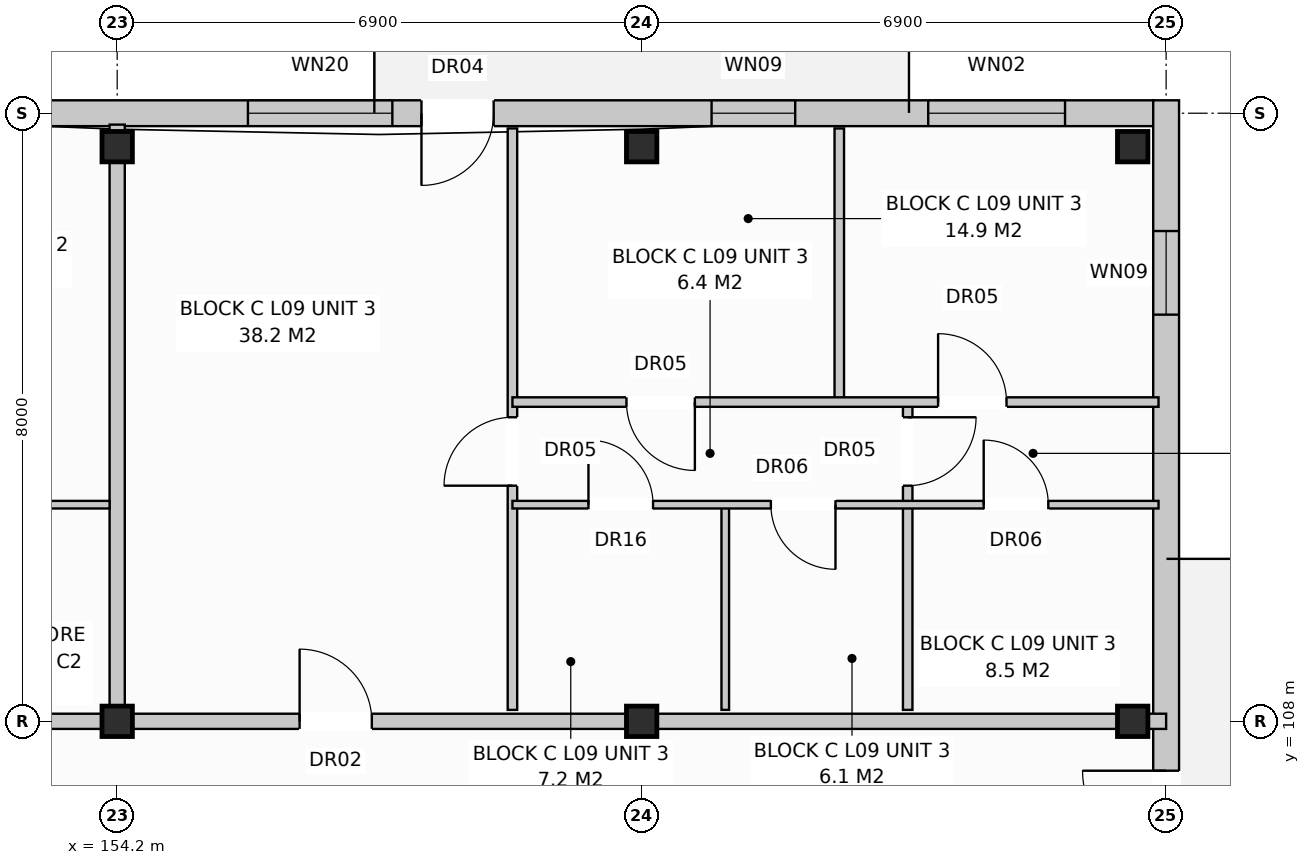
"""IFC4 building model, lengths in metres.
Left out: names, types, materials, properties, quantities, classifications, styles, units other than length and angle.
Written with IfcOpenShell. Run it as: python <this file> out.ifc"""

import sys

from ifc_helpers import new_model, si_unit, direction, frame, frame_2d, origin, origin_with_axes, origin_2d, place, context, subcontext, project, spatial, rectangle, extrude, element, fill, save


model = new_model("IFC4")
c1 = context("Model", 3, precision=1e-05, world=origin(), true_north=direction((0.0, 1.0)))
c2 = subcontext(c1, "Body", "Model", "MODEL_VIEW")
j1 = project(units=[si_unit("LENGTHUNIT", "METRE"), si_unit("PLANEANGLEUNIT", "RADIAN")], contexts=[c1])
p1 = place(None, origin())
s1 = spatial("IfcSite", under=j1, at=p1, CompositionType="ELEMENT")
p2 = place(p1, origin())
s2 = spatial("IfcBuilding", under=s1, at=p2, CompositionType="ELEMENT")
p3 = place(p2, frame((0.0, 0.0, 30.4)))
s3 = spatial("IfcBuildingStorey", under=s2, at=p3, CompositionType="ELEMENT", Elevation=30.4)
for number, where, z_axis, x_axis in (
    (1, (154.2, 108.0, 0.0), (0.0, 0.0, 1.0), (1.0, 0.0, 0.0)),
    (2, (154.2, 115.56, 0.0), (0.0, 0.0, 1.0), (1.0, 0.0, 0.0)),
    (3, (161.1, 108.0, 0.0), (0.0, 0.0, 1.0), (1.0, 0.0, 0.0)),
    (4, (161.1, 115.56, 0.0), (0.0, 0.0, 1.0), (1.0, 0.0, 0.0)),
    (5, (167.56, 108.0, 0.0), (0.0, 0.0, 1.0), (1.0, 0.0, 0.0)),
    (6, (167.56, 115.56, 0.0), (0.0, 0.0, 1.0), (1.0, 0.0, 0.0)),
):
    element("IfcColumn", number, at=place(p3, frame(where, z_axis=z_axis, x_axis=x_axis)), inside=s3, PredefinedType="COLUMN", context=c2, shape_type="SweptSolid", body=[
        extrude(rectangle(XDim=0.4, YDim=0.4, at=origin_2d()), origin(), (0.0, 0.0, 1.0), 3.2),
    ])
p4 = place(p3, frame((126.76, 116.0, 0.0), z_axis=(0.0, 0.0, 1.0), x_axis=(1.0, 0.0, 0.0)))
e7 = element("IfcWall", 7, at=p4, inside=s3, PredefinedType="STANDARD", context=c2, shape_type="SweptSolid", body=[
    extrude(rectangle(XDim=41.08, YDim=0.34, at=frame_2d((20.54, 0.0))), origin(), (0.0, 0.0, 1.0), 2.96),
])
p5 = place(p4, frame((5.11, 0.0, 0.0)))
e8 = element("IfcOpeningElement", 8, at=p5, cuts=e7, PredefinedType="OPENING", context=c2, shape_type="SweptSolid", body=[
    extrude(rectangle(XDim=0.95, YDim=2.1, at=frame_2d((0.475, 1.05))), frame((0.0, 0.182, 0.0), z_axis=(0.0, -1.0, 0.0), x_axis=(1.0, 0.0, 0.0)), (0.0, 0.0, 1.0), 0.364),
])
p6 = place(p4, frame((18.91, 0.0, 0.0)))
e9 = element("IfcOpeningElement", 9, at=p6, cuts=e7, PredefinedType="OPENING", context=c2, shape_type="SweptSolid", body=[
    extrude(rectangle(XDim=0.95, YDim=2.1, at=frame_2d((0.475, 1.05))), frame((0.0, 0.182, 0.0), z_axis=(0.0, -1.0, 0.0), x_axis=(1.0, 0.0, 0.0)), (0.0, 0.0, 1.0), 0.364),
])
p7 = place(p4, frame((31.443, 0.0, 0.0)))
e10 = element("IfcOpeningElement", 10, at=p7, cuts=e7, PredefinedType="OPENING", context=c2, shape_type="SweptSolid", body=[
    extrude(rectangle(XDim=0.95, YDim=2.1, at=frame_2d((0.475, 1.05))), frame((0.0, 0.182, 0.0), z_axis=(0.0, -1.0, 0.0), x_axis=(1.0, 0.0, 0.0)), (0.0, 0.0, 1.0), 0.364),
])
p8 = place(p4, frame((1.035, 0.0, 0.8)))
e11 = element("IfcOpeningElement", 11, at=p8, cuts=e7, PredefinedType="OPENING", context=c2, shape_type="SweptSolid", body=[
    extrude(rectangle(XDim=1.95, YDim=1.65, at=frame_2d((0.975, 0.825))), frame((0.0, 0.182, 0.0), z_axis=(0.0, -1.0, 0.0), x_axis=(1.0, 0.0, 0.0)), (0.0, 0.0, 1.0), 0.364),
])
p9 = place(p4, frame((9.36, 0.0, 0.72)))
e12 = element("IfcOpeningElement", 12, at=p9, cuts=e7, PredefinedType="OPENING", context=c2, shape_type="SweptSolid", body=[
    extrude(rectangle(XDim=1.1, YDim=1.5, at=frame_2d((0.55, 0.75))), frame((0.0, 0.182, 0.0), z_axis=(0.0, -1.0, 0.0), x_axis=(1.0, 0.0, 0.0)), (0.0, 0.0, 1.0), 0.364),
])
p10 = place(p4, frame((14.66, 0.0, 0.8)))
e13 = element("IfcOpeningElement", 13, at=p10, cuts=e7, PredefinedType="OPENING", context=c2, shape_type="SweptSolid", body=[
    extrude(rectangle(XDim=1.9, YDim=1.85, at=frame_2d((0.95, 0.925))), frame((0.0, 0.182, 0.0), z_axis=(0.0, -1.0, 0.0), x_axis=(1.0, 0.0, 0.0)), (0.0, 0.0, 1.0), 0.364),
])
p11 = place(p4, frame((21.46, 0.0, 0.72)))
e14 = element("IfcOpeningElement", 14, at=p11, cuts=e7, PredefinedType="OPENING", context=c2, shape_type="SweptSolid", body=[
    extrude(rectangle(XDim=1.1, YDim=1.5, at=frame_2d((0.55, 0.75))), frame((0.0, 0.182, 0.0), z_axis=(0.0, -1.0, 0.0), x_axis=(1.0, 0.0, 0.0)), (0.0, 0.0, 1.0), 0.364),
])
p12 = place(p4, frame((24.51, 0.0, 0.8)))
e15 = element("IfcOpeningElement", 15, at=p12, cuts=e7, PredefinedType="OPENING", context=c2, shape_type="SweptSolid", body=[
    extrude(rectangle(XDim=1.8, YDim=1.7, at=frame_2d((0.9, 0.85))), frame((0.0, 0.182, 0.0), z_axis=(0.0, -1.0, 0.0), x_axis=(1.0, 0.0, 0.0)), (0.0, 0.0, 1.0), 0.364),
])
p13 = place(p4, frame((29.16, 0.0, 0.8)))
e16 = element("IfcOpeningElement", 16, at=p13, cuts=e7, PredefinedType="OPENING", context=c2, shape_type="SweptSolid", body=[
    extrude(rectangle(XDim=1.9, YDim=1.85, at=frame_2d((0.95, 0.925))), frame((0.0, 0.182, 0.0), z_axis=(0.0, -1.0, 0.0), x_axis=(1.0, 0.0, 0.0)), (0.0, 0.0, 1.0), 0.364),
])
p14 = place(p4, frame((35.26, 0.0, 0.72)))
e17 = element("IfcOpeningElement", 17, at=p14, cuts=e7, PredefinedType="OPENING", context=c2, shape_type="SweptSolid", body=[
    extrude(rectangle(XDim=1.1, YDim=1.5, at=frame_2d((0.55, 0.75))), frame((0.0, 0.182, 0.0), z_axis=(0.0, -1.0, 0.0), x_axis=(1.0, 0.0, 0.0)), (0.0, 0.0, 1.0), 0.364),
])
p15 = place(p4, frame((38.11, 0.0, 0.8)))
e18 = element("IfcOpeningElement", 18, at=p15, cuts=e7, PredefinedType="OPENING", context=c2, shape_type="SweptSolid", body=[
    extrude(rectangle(XDim=1.8, YDim=1.7, at=frame_2d((0.9, 0.85))), frame((0.0, 0.182, 0.0), z_axis=(0.0, -1.0, 0.0), x_axis=(1.0, 0.0, 0.0)), (0.0, 0.0, 1.0), 0.364),
])
p16 = place(p3, frame((168.0, 97.43, 0.0), z_axis=(0.0, 0.0, 1.0), x_axis=(0.0, 1.0, 0.0)))
e19 = element("IfcWall", 19, at=p16, inside=s3, PredefinedType="STANDARD", context=c2, shape_type="SweptSolid", body=[
    extrude(rectangle(XDim=18.74, YDim=0.34, at=frame_2d((9.37, 0.0))), origin(), (0.0, 0.0, 1.0), 2.96),
])
p17 = place(p16, frame((8.82, 0.0, 0.0)))
e20 = element("IfcOpeningElement", 20, at=p17, cuts=e19, PredefinedType="OPENING", context=c2, shape_type="SweptSolid", body=[
    extrude(rectangle(XDim=1.1, YDim=2.1, at=frame_2d((0.55, 1.05))), frame((0.0, 0.182, 0.0), z_axis=(0.0, -1.0, 0.0), x_axis=(1.0, 0.0, 0.0)), (0.0, 0.0, 1.0), 0.364),
])
p18 = place(p16, frame((1.72, 0.0, 0.72)))
e21 = element("IfcOpeningElement", 21, at=p18, cuts=e19, PredefinedType="OPENING", context=c2, shape_type="SweptSolid", body=[
    extrude(rectangle(XDim=1.1, YDim=1.5, at=frame_2d((0.55, 0.75))), frame((0.0, 0.182, 0.0), z_axis=(0.0, -1.0, 0.0), x_axis=(1.0, 0.0, 0.0)), (0.0, 0.0, 1.0), 0.364),
])
p19 = place(p16, frame((15.92, 0.0, 0.72)))
e22 = element("IfcOpeningElement", 22, at=p19, cuts=e19, PredefinedType="OPENING", context=c2, shape_type="SweptSolid", body=[
    extrude(rectangle(XDim=1.1, YDim=1.5, at=frame_2d((0.55, 0.75))), frame((0.0, 0.182, 0.0), z_axis=(0.0, -1.0, 0.0), x_axis=(1.0, 0.0, 0.0)), (0.0, 0.0, 1.0), 0.364),
])
p20 = place(p3, frame((154.2, 108.15, 0.0), z_axis=(0.0, 0.0, 1.0), x_axis=(0.0, 1.0, 0.0)))
e23 = element("IfcWall", 23, at=p20, inside=s3, PredefinedType="PARTITIONING", context=c2, shape_type="SweptSolid", body=[
    extrude(rectangle(XDim=7.7, YDim=0.2, at=frame_2d((3.85, 0.0))), origin(), (0.0, 0.0, 1.0), 2.96),
])
p21 = place(p3, frame((133.5, 108.0, 0.0), z_axis=(0.0, 0.0, 1.0), x_axis=(1.0, 0.0, 0.0)))
e24 = element("IfcWall", 24, at=p21, inside=s3, PredefinedType="PARTITIONING", context=c2, shape_type="SweptSolid", body=[
    extrude(rectangle(XDim=20.7, YDim=0.2, at=frame_2d((10.35, 0.0))), origin(), (0.0, 0.0, 1.0), 2.4),
])
p22 = place(p21, frame((2.4, 0.0, 0.0)))
e25 = element("IfcOpeningElement", 25, at=p22, cuts=e24, PredefinedType="OPENING", context=c2, shape_type="SweptSolid", body=[
    extrude(rectangle(XDim=0.95, YDim=2.15, at=frame_2d((0.475, 1.075))), frame((0.0, 0.112, 0.0), z_axis=(0.0, -1.0, 0.0), x_axis=(1.0, 0.0, 0.0)), (0.0, 0.0, 1.0), 0.224),
])
p23 = place(p3, frame((139.8, 110.85, 0.0), z_axis=(0.0, 0.0, 1.0), x_axis=(1.0, 0.0, 0.0)))
e26 = element("IfcWall", 26, at=p23, inside=s3, PredefinedType="PARTITIONING", context=c2, shape_type="SweptSolid", body=[
    extrude(rectangle(XDim=14.3, YDim=0.1, at=frame_2d((7.15, 0.0))), origin(), (0.0, 0.0, 1.0), 2.96),
])
p24 = place(p23, frame((1.6, 0.0, 0.0)))
e27 = element("IfcOpeningElement", 27, at=p24, cuts=e26, PredefinedType="OPENING", context=c2, shape_type="SweptSolid", body=[
    extrude(rectangle(XDim=0.9, YDim=2.1, at=frame_2d((0.45, 1.05))), frame((0.0, 0.062, 0.0), z_axis=(0.0, -1.0, 0.0), x_axis=(1.0, 0.0, 0.0)), (0.0, 0.0, 1.0), 0.124),
])
p25 = place(p23, frame((5.1, 0.0, 0.0)))
e28 = element("IfcOpeningElement", 28, at=p25, cuts=e26, PredefinedType="OPENING", context=c2, shape_type="SweptSolid", body=[
    extrude(rectangle(XDim=0.85, YDim=2.05, at=frame_2d((0.425, 1.025))), frame((0.0, 0.062, 0.0), z_axis=(0.0, -1.0, 0.0), x_axis=(1.0, 0.0, 0.0)), (0.0, 0.0, 1.0), 0.124),
])
p26 = place(p23, frame((8.2, 0.0, 0.0)))
e29 = element("IfcOpeningElement", 29, at=p26, cuts=e26, PredefinedType="OPENING", context=c2, shape_type="SweptSolid", body=[
    extrude(rectangle(XDim=0.85, YDim=2.05, at=frame_2d((0.425, 1.025))), frame((0.0, 0.062, 0.0), z_axis=(0.0, -1.0, 0.0), x_axis=(1.0, 0.0, 0.0)), (0.0, 0.0, 1.0), 0.124),
])
p27 = place(p23, frame((11.6, 0.0, 0.0)))
e30 = element("IfcOpeningElement", 30, at=p27, cuts=e26, PredefinedType="OPENING", context=c2, shape_type="SweptSolid", body=[
    extrude(rectangle(XDim=0.85, YDim=2.05, at=frame_2d((0.425, 1.025))), frame((0.0, 0.062, 0.0), z_axis=(0.0, -1.0, 0.0), x_axis=(1.0, 0.0, 0.0)), (0.0, 0.0, 1.0), 0.124),
])
p28 = place(p3, frame((154.2, 108.0, 0.0), z_axis=(0.0, 0.0, 1.0), x_axis=(1.0, 0.0, 0.0)))
e31 = element("IfcWall", 31, at=p28, inside=s3, PredefinedType="PARTITIONING", context=c2, shape_type="SweptSolid", body=[
    extrude(rectangle(XDim=13.8, YDim=0.2, at=frame_2d((6.9, 0.0))), origin(), (0.0, 0.0, 1.0), 2.4),
])
p29 = place(p28, frame((2.4, 0.0, 0.0)))
e32 = element("IfcOpeningElement", 32, at=p29, cuts=e31, PredefinedType="OPENING", context=c2, shape_type="SweptSolid", body=[
    extrude(rectangle(XDim=0.95, YDim=2.15, at=frame_2d((0.475, 1.075))), frame((0.0, 0.112, 0.0), z_axis=(0.0, -1.0, 0.0), x_axis=(1.0, 0.0, 0.0)), (0.0, 0.0, 1.0), 0.224),
])
p30 = place(p3, frame((159.4, 108.15, 0.0), z_axis=(0.0, 0.0, 1.0), x_axis=(0.0, 1.0, 0.0)))
e33 = element("IfcWall", 33, at=p30, inside=s3, PredefinedType="PARTITIONING", context=c2, shape_type="SweptSolid", body=[
    extrude(rectangle(XDim=7.65, YDim=0.125, at=frame_2d((3.825, 0.0))), origin(), (0.0, 0.0, 1.0), 2.96),
])
p31 = place(p30, frame((2.95, 0.0, 0.0)))
e34 = element("IfcOpeningElement", 34, at=p31, cuts=e33, PredefinedType="OPENING", context=c2, shape_type="SweptSolid", body=[
    extrude(rectangle(XDim=0.9, YDim=2.1, at=frame_2d((0.45, 1.05))), frame((0.0, 0.074, 0.0), z_axis=(0.0, -1.0, 0.0), x_axis=(1.0, 0.0, 0.0)), (0.0, 0.0, 1.0), 0.149),
])
p32 = place(p3, frame((162.2, 108.15, 0.0), z_axis=(0.0, 0.0, 1.0), x_axis=(0.0, 1.0, 0.0)))
e35 = element("IfcWall", 35, at=p32, inside=s3, PredefinedType="PARTITIONING", context=c2, shape_type="SweptSolid", body=[
    extrude(rectangle(XDim=2.7, YDim=0.1, at=frame_2d((1.35, 0.0))), origin(), (0.0, 0.0, 1.0), 2.96),
])
p33 = place(p3, frame((164.6, 108.15, 0.0), z_axis=(0.0, 0.0, 1.0), x_axis=(0.0, 1.0, 0.0)))
e36 = element("IfcWall", 36, at=p33, inside=s3, PredefinedType="PARTITIONING", context=c2, shape_type="SweptSolid", body=[
    extrude(rectangle(XDim=4.05, YDim=0.125, at=frame_2d((2.025, 0.0))), origin(), (0.0, 0.0, 1.0), 2.96),
])
p34 = place(p33, frame((2.95, 0.0, 0.0)))
e37 = element("IfcOpeningElement", 37, at=p34, cuts=e36, PredefinedType="OPENING", context=c2, shape_type="SweptSolid", body=[
    extrude(rectangle(XDim=0.9, YDim=2.1, at=frame_2d((0.45, 1.05))), frame((0.0, 0.074, 0.0), z_axis=(0.0, -1.0, 0.0), x_axis=(1.0, 0.0, 0.0)), (0.0, 0.0, 1.0), 0.149),
])
p35 = place(p3, frame((163.7, 112.2, 0.0), z_axis=(0.0, 0.0, 1.0), x_axis=(0.0, 1.0, 0.0)))
e38 = element("IfcWall", 38, at=p35, inside=s3, PredefinedType="PARTITIONING", context=c2, shape_type="SweptSolid", body=[
    extrude(rectangle(XDim=3.6, YDim=0.125, at=frame_2d((1.8, 0.0))), origin(), (0.0, 0.0, 1.0), 2.59),
])
p36 = place(p3, frame((159.4, 110.85, 0.0), z_axis=(0.0, 0.0, 1.0), x_axis=(1.0, 0.0, 0.0)))
e39 = element("IfcWall", 39, at=p36, inside=s3, PredefinedType="PARTITIONING", context=c2, shape_type="SweptSolid", body=[
    extrude(rectangle(XDim=8.5, YDim=0.1, at=frame_2d((4.25, 0.0))), origin(), (0.0, 0.0, 1.0), 2.96),
])
p37 = place(p36, frame((1.0, 0.0, 0.0)))
e40 = element("IfcOpeningElement", 40, at=p37, cuts=e39, PredefinedType="OPENING", context=c2, shape_type="SweptSolid", body=[
    extrude(rectangle(XDim=0.85, YDim=2.1, at=frame_2d((0.425, 1.05))), frame((0.0, 0.062, 0.0), z_axis=(0.0, -1.0, 0.0), x_axis=(1.0, 0.0, 0.0)), (0.0, 0.0, 1.0), 0.124),
])
p38 = place(p36, frame((3.4, 0.0, 0.0)))
e41 = element("IfcOpeningElement", 41, at=p38, cuts=e39, PredefinedType="OPENING", context=c2, shape_type="SweptSolid", body=[
    extrude(rectangle(XDim=0.85, YDim=2.05, at=frame_2d((0.425, 1.025))), frame((0.0, 0.062, 0.0), z_axis=(0.0, -1.0, 0.0), x_axis=(1.0, 0.0, 0.0)), (0.0, 0.0, 1.0), 0.124),
])
p39 = place(p36, frame((6.2, 0.0, 0.0)))
e42 = element("IfcOpeningElement", 42, at=p39, cuts=e39, PredefinedType="OPENING", context=c2, shape_type="SweptSolid", body=[
    extrude(rectangle(XDim=0.85, YDim=2.05, at=frame_2d((0.425, 1.025))), frame((0.0, 0.062, 0.0), z_axis=(0.0, -1.0, 0.0), x_axis=(1.0, 0.0, 0.0)), (0.0, 0.0, 1.0), 0.124),
])
p40 = place(p3, frame((159.4, 112.2, 0.0), z_axis=(0.0, 0.0, 1.0), x_axis=(1.0, 0.0, 0.0)))
e43 = element("IfcWall", 43, at=p40, inside=s3, PredefinedType="PARTITIONING", context=c2, shape_type="SweptSolid", body=[
    extrude(rectangle(XDim=8.5, YDim=0.125, at=frame_2d((4.25, 0.0))), origin(), (0.0, 0.0, 1.0), 2.96),
])
p41 = place(p40, frame((1.5, 0.0, 0.0)))
e44 = element("IfcOpeningElement", 44, at=p41, cuts=e43, PredefinedType="OPENING", context=c2, shape_type="SweptSolid", body=[
    extrude(rectangle(XDim=0.9, YDim=2.1, at=frame_2d((0.45, 1.05))), frame((0.0, 0.074, 0.0), z_axis=(0.0, -1.0, 0.0), x_axis=(1.0, 0.0, 0.0)), (0.0, 0.0, 1.0), 0.149),
])
p42 = place(p40, frame((5.6, 0.0, 0.0)))
e45 = element("IfcOpeningElement", 45, at=p42, cuts=e43, PredefinedType="OPENING", context=c2, shape_type="SweptSolid", body=[
    extrude(rectangle(XDim=0.9, YDim=2.1, at=frame_2d((0.45, 1.05))), frame((0.0, 0.074, 0.0), z_axis=(0.0, -1.0, 0.0), x_axis=(1.0, 0.0, 0.0)), (0.0, 0.0, 1.0), 0.149),
])
p43 = place(p7, frame((0.95, 0.0, 0.0), z_axis=(0.0, 0.0, 1.0), x_axis=(-1.0, 0.0, 0.0)))
e46 = element("IfcDoor", 46, at=p43, inside=s3, OperationType="SINGLE_SWING_LEFT", PredefinedType="DOOR", context=c2, shape_type="SweptSolid", body=[
    extrude(rectangle(XDim=0.95, YDim=2.1, at=frame_2d((0.475, 1.05))), frame((0.0, 0.025, 0.0), z_axis=(0.0, -1.0, 0.0), x_axis=(1.0, 0.0, 0.0)), (0.0, 0.0, 1.0), 0.05),
])
fill(e10, e46)
p44 = place(p13, origin_with_axes())
e47 = element("IfcWindow", 47, at=p44, inside=s3, PartitioningType="SINGLE_PANEL", PredefinedType="WINDOW", context=c2, shape_type="SweptSolid", body=[
    extrude(rectangle(XDim=1.9, YDim=1.85, at=frame_2d((0.95, 0.925))), frame((0.0, 0.03, 0.0), z_axis=(0.0, -1.0, 0.0), x_axis=(1.0, 0.0, 0.0)), (0.0, 0.0, 1.0), 0.06),
])
fill(e16, e47)
p45 = place(p14, origin_with_axes())
e48 = element("IfcWindow", 48, at=p45, inside=s3, PartitioningType="SINGLE_PANEL", PredefinedType="WINDOW", context=c2, shape_type="SweptSolid", body=[
    extrude(rectangle(XDim=1.1, YDim=1.5, at=frame_2d((0.55, 0.75))), frame((0.0, 0.03, 0.0), z_axis=(0.0, -1.0, 0.0), x_axis=(1.0, 0.0, 0.0)), (0.0, 0.0, 1.0), 0.06),
])
fill(e17, e48)
p46 = place(p15, origin_with_axes())
e49 = element("IfcWindow", 49, at=p46, inside=s3, PartitioningType="SINGLE_PANEL", PredefinedType="WINDOW", context=c2, shape_type="SweptSolid", body=[
    extrude(rectangle(XDim=1.8, YDim=1.7, at=frame_2d((0.9, 0.85))), frame((0.0, 0.03, 0.0), z_axis=(0.0, -1.0, 0.0), x_axis=(1.0, 0.0, 0.0)), (0.0, 0.0, 1.0), 0.06),
])
fill(e18, e49)
p47 = place(p17, origin_with_axes())
e50 = element("IfcDoor", 50, at=p47, inside=s3, OperationType="SINGLE_SWING_RIGHT", PredefinedType="DOOR", context=c2, shape_type="SweptSolid", body=[
    extrude(rectangle(XDim=1.1, YDim=2.1, at=frame_2d((0.55, 1.05))), frame((0.0, 0.025, 0.0), z_axis=(0.0, -1.0, 0.0), x_axis=(1.0, 0.0, 0.0)), (0.0, 0.0, 1.0), 0.05),
])
fill(e20, e50)
p48 = place(p19, origin_with_axes())
e51 = element("IfcWindow", 51, at=p48, inside=s3, PartitioningType="SINGLE_PANEL", PredefinedType="WINDOW", context=c2, shape_type="SweptSolid", body=[
    extrude(rectangle(XDim=1.1, YDim=1.5, at=frame_2d((0.55, 0.75))), frame((0.0, 0.03, 0.0), z_axis=(0.0, -1.0, 0.0), x_axis=(1.0, 0.0, 0.0)), (0.0, 0.0, 1.0), 0.06),
])
fill(e22, e51)
p49 = place(p29, origin_with_axes())
e52 = element("IfcDoor", 52, at=p49, inside=s3, OperationType="SINGLE_SWING_LEFT", PredefinedType="DOOR", context=c2, shape_type="SweptSolid", body=[
    extrude(rectangle(XDim=0.95, YDim=2.15, at=frame_2d((0.475, 1.075))), frame((0.0, 0.025, 0.0), z_axis=(0.0, -1.0, 0.0), x_axis=(1.0, 0.0, 0.0)), (0.0, 0.0, 1.0), 0.05),
])
fill(e32, e52)
p50 = place(p31, origin_with_axes())
e53 = element("IfcDoor", 53, at=p50, inside=s3, OperationType="SINGLE_SWING_LEFT", PredefinedType="DOOR", context=c2, shape_type="SweptSolid", body=[
    extrude(rectangle(XDim=0.9, YDim=2.1, at=frame_2d((0.45, 1.05))), frame((0.0, 0.025, 0.0), z_axis=(0.0, -1.0, 0.0), x_axis=(1.0, 0.0, 0.0)), (0.0, 0.0, 1.0), 0.05),
])
fill(e34, e53)
p51 = place(p34, frame((0.9, 0.0, 0.0), z_axis=(0.0, 0.0, 1.0), x_axis=(-1.0, 0.0, 0.0)))
e54 = element("IfcDoor", 54, at=p51, inside=s3, OperationType="SINGLE_SWING_RIGHT", PredefinedType="DOOR", context=c2, shape_type="SweptSolid", body=[
    extrude(rectangle(XDim=0.9, YDim=2.1, at=frame_2d((0.45, 1.05))), frame((0.0, 0.025, 0.0), z_axis=(0.0, -1.0, 0.0), x_axis=(1.0, 0.0, 0.0)), (0.0, 0.0, 1.0), 0.05),
])
fill(e37, e54)
p52 = place(p37, origin_with_axes())
e55 = element("IfcDoor", 55, at=p52, inside=s3, OperationType="SINGLE_SWING_LEFT", PredefinedType="DOOR", context=c2, shape_type="SweptSolid", body=[
    extrude(rectangle(XDim=0.85, YDim=2.1, at=frame_2d((0.425, 1.05))), frame((0.0, 0.025, 0.0), z_axis=(0.0, -1.0, 0.0), x_axis=(1.0, 0.0, 0.0)), (0.0, 0.0, 1.0), 0.05),
])
fill(e40, e55)
p53 = place(p38, frame((0.85, 0.0, 0.0), z_axis=(0.0, 0.0, 1.0), x_axis=(-1.0, 0.0, 0.0)))
e56 = element("IfcDoor", 56, at=p53, inside=s3, OperationType="SINGLE_SWING_RIGHT", PredefinedType="DOOR", context=c2, shape_type="SweptSolid", body=[
    extrude(rectangle(XDim=0.85, YDim=2.05, at=frame_2d((0.425, 1.025))), frame((0.0, 0.025, 0.0), z_axis=(0.0, -1.0, 0.0), x_axis=(1.0, 0.0, 0.0)), (0.0, 0.0, 1.0), 0.05),
])
fill(e41, e56)
p54 = place(p39, origin_with_axes())
e57 = element("IfcDoor", 57, at=p54, inside=s3, OperationType="SINGLE_SWING_LEFT", PredefinedType="DOOR", context=c2, shape_type="SweptSolid", body=[
    extrude(rectangle(XDim=0.85, YDim=2.05, at=frame_2d((0.425, 1.025))), frame((0.0, 0.025, 0.0), z_axis=(0.0, -1.0, 0.0), x_axis=(1.0, 0.0, 0.0)), (0.0, 0.0, 1.0), 0.05),
])
fill(e42, e57)
p55 = place(p41, frame((0.9, 0.0, 0.0), z_axis=(0.0, 0.0, 1.0), x_axis=(-1.0, 0.0, 0.0)))
e58 = element("IfcDoor", 58, at=p55, inside=s3, OperationType="SINGLE_SWING_RIGHT", PredefinedType="DOOR", context=c2, shape_type="SweptSolid", body=[
    extrude(rectangle(XDim=0.9, YDim=2.1, at=frame_2d((0.45, 1.05))), frame((0.0, 0.025, 0.0), z_axis=(0.0, -1.0, 0.0), x_axis=(1.0, 0.0, 0.0)), (0.0, 0.0, 1.0), 0.05),
])
fill(e44, e58)
p56 = place(p42, origin_with_axes())
e59 = element("IfcDoor", 59, at=p56, inside=s3, OperationType="SINGLE_SWING_LEFT", PredefinedType="DOOR", context=c2, shape_type="SweptSolid", body=[
    extrude(rectangle(XDim=0.9, YDim=2.1, at=frame_2d((0.45, 1.05))), frame((0.0, 0.025, 0.0), z_axis=(0.0, -1.0, 0.0), x_axis=(1.0, 0.0, 0.0)), (0.0, 0.0, 1.0), 0.05),
])
fill(e45, e59)
save(model, sys.argv[1])
